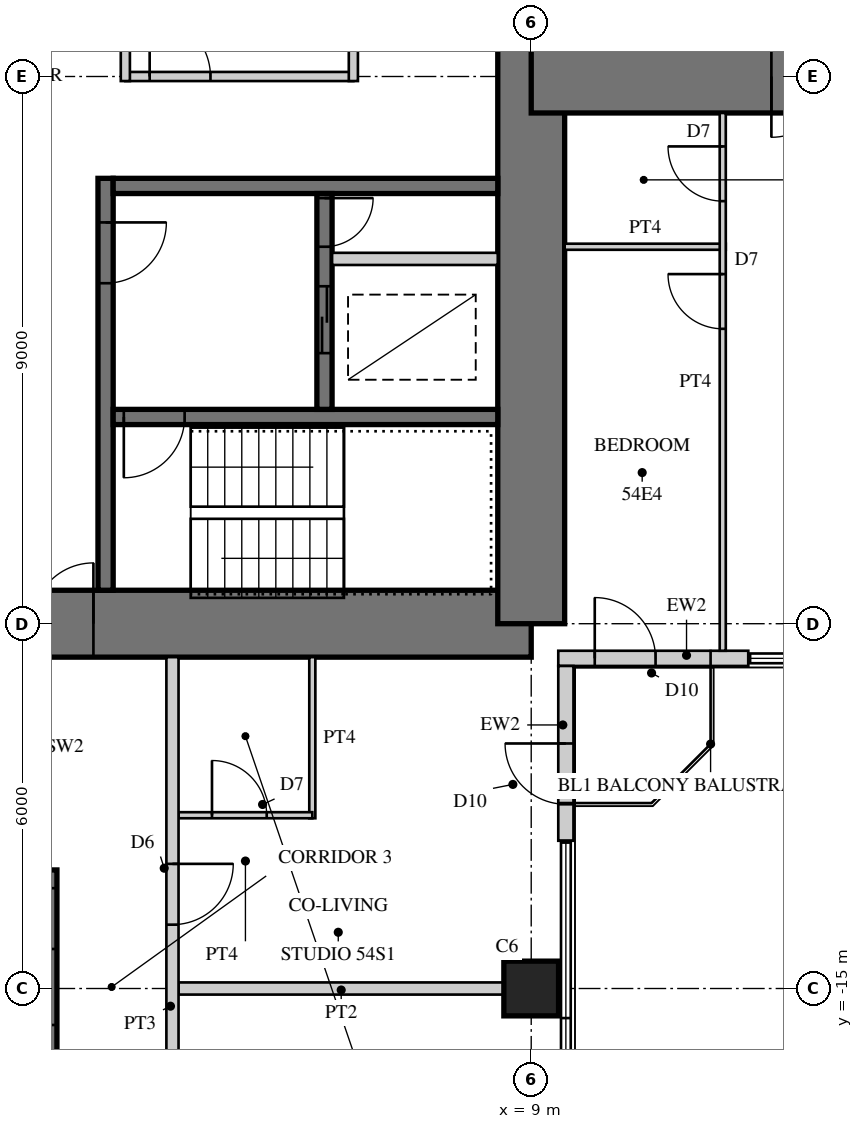
"""IFC4 building model, lengths in metres.
Left out: names, types, materials, properties, quantities, classifications, styles, units other than length and angle.
Written with IfcOpenShell. Run it as: python <this file> out.ifc"""

import sys

from ifc_helpers import new_model, si_unit, direction, frame, frame_2d, origin, origin_2d, place, context, subcontext, project, spatial, rectangle, hollow_rectangle, extrude, element, fill, save


model = new_model("IFC4")
c1 = context("Model", 3, precision=1e-05, world=origin(), true_north=direction((0.0, 1.0)))
c2 = subcontext(c1, "Body", "Model", "MODEL_VIEW")
j1 = project(units=[si_unit("LENGTHUNIT", "METRE"), si_unit("PLANEANGLEUNIT", "RADIAN")], contexts=[c1])
p1 = place(None, origin())
s1 = spatial("IfcSite", under=j1, at=p1, CompositionType="ELEMENT")
p2 = place(p1, origin())
s2 = spatial("IfcBuilding", under=s1, at=p2, CompositionType="ELEMENT")
p3 = place(p2, frame((0.0, 0.0, 213.7)))
s3 = spatial("IfcBuildingStorey", under=s2, at=p3, CompositionType="ELEMENT", Elevation=213.7)
p4 = place(p3, frame((-9.0, -9.0, 0.0), z_axis=(0.0, 0.0, 1.0), x_axis=(1.0, 0.0, 0.0)))
e1 = element("IfcWall", 1, at=p4, inside=s3, PredefinedType="SHEAR", context=c2, shape_type="SweptSolid", body=[
    extrude(rectangle(XDim=18.0, YDim=1.1, at=frame_2d((9.0, 0.0))), origin(), (0.0, 0.0, 1.0), 3.4),
])
p5 = place(p4, frame((9.8, 0.0, 0.0)))
e2 = element("IfcOpeningElement", 2, at=p5, cuts=e1, PredefinedType="OPENING", context=c2, shape_type="SweptSolid", body=[
    extrude(rectangle(XDim=1.0, YDim=2.4, at=frame_2d((0.5, 1.2))), frame((0.0, 0.56, 0.0), z_axis=(0.0, -1.0, 0.0), x_axis=(1.0, 0.0, 0.0)), (0.0, 0.0, 1.0), 1.12),
])
p6 = place(p3, frame((9.0, -9.0, 0.0), z_axis=(0.0, 0.0, 1.0), x_axis=(0.0, 1.0, 0.0)))
e3 = element("IfcWall", 3, at=p6, inside=s3, PredefinedType="SHEAR", context=c2, shape_type="SweptSolid", body=[
    extrude(rectangle(XDim=18.0, YDim=1.1, at=frame_2d((9.0, 0.0))), origin(), (0.0, 0.0, 1.0), 3.4),
])
p7 = place(p6, frame((9.8, 0.0, 0.0)))
e4 = element("IfcOpeningElement", 4, at=p7, cuts=e3, PredefinedType="OPENING", context=c2, shape_type="SweptSolid", body=[
    extrude(rectangle(XDim=1.0, YDim=2.4, at=frame_2d((0.5, 1.2))), frame((0.0, 0.56, 0.0), z_axis=(0.0, -1.0, 0.0), x_axis=(1.0, 0.0, 0.0)), (0.0, 0.0, 1.0), 1.12),
])
p8 = place(p3, frame((2.0, -1.675, 0.0), z_axis=(0.0, 0.0, 1.0), x_axis=(0.0, -1.0, 0.0)))
e5 = element("IfcWall", 5, at=p8, inside=s3, PredefinedType="SHEAR", context=c2, shape_type="SweptSolid", body=[
    extrude(rectangle(XDim=6.775, YDim=0.25, at=frame_2d((3.387, 0.0))), origin(), (0.0, 0.0, 1.0), 3.4),
])
p9 = place(p8, frame((0.725, 0.0, 0.0)))
e6 = element("IfcOpeningElement", 6, at=p9, cuts=e5, PredefinedType="OPENING", context=c2, shape_type="SweptSolid", body=[
    extrude(rectangle(XDim=1.0, YDim=2.1, at=frame_2d((0.5, 1.05))), frame((0.0, 0.135, 0.0), z_axis=(0.0, -1.0, 0.0), x_axis=(1.0, 0.0, 0.0)), (0.0, 0.0, 1.0), 0.27),
])
p10 = place(p3, frame((2.125, -1.8, 0.0), z_axis=(0.0, 0.0, 1.0), x_axis=(1.0, 0.0, 0.0)))
e7 = element("IfcWall", 7, at=p10, inside=s3, PredefinedType="SHEAR", context=c2, shape_type="SweptSolid", body=[
    extrude(rectangle(XDim=6.325, YDim=0.25, at=frame_2d((3.163, 0.0))), origin(), (0.0, 0.0, 1.0), 3.4),
])
p11 = place(p3, frame((2.125, -5.6, 0.0), z_axis=(0.0, 0.0, 1.0), x_axis=(1.0, 0.0, 0.0)))
e8 = element("IfcWall", 8, at=p11, inside=s3, PredefinedType="SHEAR", context=c2, shape_type="SweptSolid", body=[
    extrude(rectangle(XDim=6.325, YDim=0.25, at=frame_2d((3.163, 0.0))), origin(), (0.0, 0.0, 1.0), 3.4),
])
p12 = place(p11, frame((0.175, 0.0, 0.0)))
e9 = element("IfcOpeningElement", 9, at=p12, cuts=e8, PredefinedType="OPENING", context=c2, shape_type="SweptSolid", body=[
    extrude(rectangle(XDim=1.0, YDim=2.1, at=frame_2d((0.5, 1.05))), frame((0.0, 0.135, 0.0), z_axis=(0.0, -1.0, 0.0), x_axis=(1.0, 0.0, 0.0)), (0.0, 0.0, 1.0), 0.27),
])
p13 = place(p3, frame((5.6, -1.925, 0.0), z_axis=(0.0, 0.0, 1.0), x_axis=(0.0, -1.0, 0.0)))
e10 = element("IfcWall", 10, at=p13, inside=s3, PredefinedType="SHEAR", context=c2, shape_type="SweptSolid", body=[
    extrude(rectangle(XDim=3.55, YDim=0.25, at=frame_2d((1.775, 0.0))), origin(), (0.0, 0.0, 1.0), 3.4),
])
p14 = place(p13, frame((1.525, 0.0, 0.0)))
e11 = element("IfcOpeningElement", 11, at=p14, cuts=e10, PredefinedType="OPENING", context=c2, shape_type="SweptSolid", body=[
    extrude(rectangle(XDim=1.1, YDim=2.2, at=frame_2d((0.55, 1.1))), frame((0.0, 0.135, 0.0), z_axis=(0.0, -1.0, 0.0), x_axis=(1.0, 0.0, 0.0)), (0.0, 0.0, 1.0), 0.27),
])
p15 = place(p13, frame((0.075, 0.0, 0.0)))
e12 = element("IfcOpeningElement", 12, at=p15, cuts=e10, PredefinedType="OPENING", context=c2, shape_type="SweptSolid", body=[
    extrude(rectangle(XDim=0.8, YDim=2.1, at=frame_2d((0.4, 1.05))), frame((0.0, 0.135, 0.0), z_axis=(0.0, -1.0, 0.0), x_axis=(1.0, 0.0, 0.0)), (0.0, 0.0, 1.0), 0.27),
])
p16 = place(p3, frame((5.725, -3.0, 0.0), z_axis=(0.0, 0.0, 1.0), x_axis=(1.0, 0.0, 0.0)))
e13 = element("IfcWall", 13, at=p16, inside=s3, PredefinedType="PARTITIONING", context=c2, shape_type="SweptSolid", body=[
    extrude(rectangle(XDim=2.725, YDim=0.2, at=frame_2d((1.362, 0.0))), origin(), (0.0, 0.0, 1.0), 3.4),
])
p17 = place(p3, frame((9.0, 0.0, 0.0), z_axis=(0.0, 0.0, 1.0), x_axis=(1.0, 0.0, 0.0)))
e14 = element("IfcWall", 14, at=p17, inside=s3, PredefinedType="SHEAR", context=c2, shape_type="SweptSolid", body=[
    extrude(rectangle(XDim=9.0, YDim=1.2, at=frame_2d((4.5, 0.0))), origin(), (0.0, 0.0, 1.0), 3.4),
])
p18 = place(p17, frame((3.95, 0.0, 0.0)))
e15 = element("IfcOpeningElement", 15, at=p18, cuts=e14, PredefinedType="OPENING", context=c2, shape_type="SweptSolid", body=[
    extrude(rectangle(XDim=1.0, YDim=2.15, at=frame_2d((0.5, 1.075))), frame((0.0, 0.61, 0.0), z_axis=(0.0, -1.0, 0.0), x_axis=(1.0, 0.0, 0.0)), (0.0, 0.0, 1.0), 1.22),
])
p19 = place(p17, frame((7.0, 0.0, 0.0)))
e16 = element("IfcOpeningElement", 16, at=p19, cuts=e14, PredefinedType="OPENING", context=c2, shape_type="SweptSolid", body=[
    extrude(rectangle(XDim=1.0, YDim=2.2, at=frame_2d((0.5, 1.1))), frame((0.0, 0.61, 0.0), z_axis=(0.0, -1.0, 0.0), x_axis=(1.0, 0.0, 0.0)), (0.0, 0.0, 1.0), 1.22),
])
p20 = place(p3, frame((0.0, -13.05, 0.0), z_axis=(0.0, 0.0, 1.0), x_axis=(0.0, -1.0, 0.0)))
e17 = element("IfcWall", 17, at=p20, inside=s3, PredefinedType="SHEAR", context=c2, shape_type="SweptSolid", body=[
    extrude(rectangle(XDim=13.95, YDim=2.4, at=frame_2d((6.975, 0.0))), origin(), (0.0, 0.0, 1.0), 3.4),
])
p21 = place(p20, frame((0.3, 0.0, 0.0)))
e18 = element("IfcOpeningElement", 18, at=p21, cuts=e17, PredefinedType="OPENING", context=c2, shape_type="SweptSolid", body=[
    extrude(rectangle(XDim=1.0, YDim=2.15, at=frame_2d((0.5, 1.075))), frame((0.0, 1.21, 0.0), z_axis=(0.0, -1.0, 0.0), x_axis=(1.0, 0.0, 0.0)), (0.0, 0.0, 1.0), 2.42),
])
p22 = place(p20, frame((2.55, 0.0, 0.0)))
e19 = element("IfcOpeningElement", 19, at=p22, cuts=e17, PredefinedType="OPENING", context=c2, shape_type="SweptSolid", body=[
    extrude(rectangle(XDim=1.0, YDim=2.15, at=frame_2d((0.5, 1.075))), frame((0.0, 1.21, 0.0), z_axis=(0.0, -1.0, 0.0), x_axis=(1.0, 0.0, 0.0)), (0.0, 0.0, 1.0), 2.42),
])
p23 = place(p20, frame((9.2, 0.0, 0.0)))
e20 = element("IfcOpeningElement", 20, at=p23, cuts=e17, PredefinedType="OPENING", context=c2, shape_type="SweptSolid", body=[
    extrude(rectangle(XDim=1.0, YDim=2.0, at=frame_2d((0.5, 1.0))), frame((0.0, 1.21, 0.0), z_axis=(0.0, -1.0, 0.0), x_axis=(1.0, 0.0, 0.0)), (0.0, 0.0, 1.0), 2.42),
])
p24 = place(p3, frame((9.0, -15.0, 0.0), z_axis=(0.0, 0.0, 1.0), x_axis=(1.0, 0.0, 0.0)))
e21 = element("IfcColumn", 21, at=p24, inside=s3, PredefinedType="COLUMN", context=c2, shape_type="SweptSolid", body=[
    extrude(rectangle(XDim=0.9, YDim=0.9, at=origin_2d()), origin(), (0.0, 0.0, 1.0), 3.4),
])
p25 = place(p3, frame((9.445, -9.57, 0.0), z_axis=(0.0, 0.0, 1.0), x_axis=(1.0, 0.0, 0.0)))
e22 = element("IfcWall", 22, at=p25, inside=s3, PredefinedType="SOLIDWALL", context=c2, shape_type="SweptSolid", body=[
    extrude(rectangle(XDim=3.125, YDim=0.25, at=frame_2d((1.562, 0.0))), origin(), (0.0, 0.0, 1.0), 3.15),
])
p26 = place(p25, frame((0.6, 0.0, 0.0)))
e23 = element("IfcOpeningElement", 23, at=p26, cuts=e22, PredefinedType="OPENING", context=c2, shape_type="SweptSolid", body=[
    extrude(rectangle(XDim=1.0, YDim=2.2, at=frame_2d((0.5, 1.1))), frame((0.0, 0.135, 0.0), z_axis=(0.0, -1.0, 0.0), x_axis=(1.0, 0.0, 0.0)), (0.0, 0.0, 1.0), 0.27),
])
p27 = place(p3, frame((9.57, -12.57, 0.0), z_axis=(0.0, 0.0, 1.0), x_axis=(0.0, 1.0, 0.0)))
e24 = element("IfcWall", 24, at=p27, inside=s3, PredefinedType="SOLIDWALL", context=c2, shape_type="SweptSolid", body=[
    extrude(rectangle(XDim=2.875, YDim=0.25, at=frame_2d((1.438, 0.0))), origin(), (0.0, 0.0, 1.0), 3.15),
])
p28 = place(p27, frame((0.6, 0.0, 0.0)))
e25 = element("IfcOpeningElement", 25, at=p28, cuts=e24, PredefinedType="OPENING", context=c2, shape_type="SweptSolid", body=[
    extrude(rectangle(XDim=1.0, YDim=2.2, at=frame_2d((0.5, 1.1))), frame((0.0, 0.135, 0.0), z_axis=(0.0, -1.0, 0.0), x_axis=(1.0, 0.0, 0.0)), (0.0, 0.0, 1.0), 0.27),
])
p29 = place(p3, frame((2.325, 0.0, 0.0), z_axis=(0.0, 0.0, 1.0), x_axis=(1.0, 0.0, 0.0)))
e26 = element("IfcWall", 26, at=p29, inside=s3, PredefinedType="PARTITIONING", context=c2, shape_type="SweptSolid", body=[
    extrude(rectangle(XDim=3.75, YDim=0.15, at=frame_2d((1.875, 0.0))), origin(), (0.0, 0.0, 1.0), 3.15),
])
p30 = place(p29, frame((0.4, 0.0, 0.0)))
e27 = element("IfcOpeningElement", 27, at=p30, cuts=e26, PredefinedType="OPENING", context=c2, shape_type="SweptSolid", body=[
    extrude(rectangle(XDim=1.0, YDim=2.1, at=frame_2d((0.5, 1.05))), frame((0.0, 0.085, 0.0), z_axis=(0.0, -1.0, 0.0), x_axis=(1.0, 0.0, 0.0)), (0.0, 0.0, 1.0), 0.17),
])
for number, where, z_axis, x_axis in (
    (28, (2.325, 1.875, 0.0), (0.0, 0.0, 1.0), (0.0, -1.0, 0.0)),
    (29, (6.075, -0.075, 0.0), (0.0, 0.0, 1.0), (0.0, 1.0, 0.0)),
):
    element("IfcWall", number, at=place(p3, frame(where, z_axis=z_axis, x_axis=x_axis)), inside=s3, PredefinedType="PARTITIONING", context=c2, shape_type="SweptSolid", body=[
        extrude(rectangle(XDim=1.95, YDim=0.15, at=frame_2d((0.975, 0.0))), origin(), (0.0, 0.0, 1.0), 3.15),
    ])
p31 = place(p3, frame((9.55, -2.8, 0.0), z_axis=(0.0, 0.0, 1.0), x_axis=(1.0, 0.0, 0.0)))
e30 = element("IfcWall", 30, at=p31, inside=s3, PredefinedType="PARTITIONING", context=c2, shape_type="SweptSolid", body=[
    extrude(rectangle(XDim=2.65, YDim=0.1, at=frame_2d((1.325, 0.0))), origin(), (0.0, 0.0, 1.0), 3.15),
])
p32 = place(p3, frame((12.15, -9.445, 0.0), z_axis=(0.0, 0.0, 1.0), x_axis=(0.0, 1.0, 0.0)))
e31 = element("IfcWall", 31, at=p32, inside=s3, PredefinedType="PARTITIONING", context=c2, shape_type="SweptSolid", body=[
    extrude(rectangle(XDim=8.845, YDim=0.1, at=frame_2d((4.422, 0.0))), origin(), (0.0, 0.0, 1.0), 3.15),
])
p33 = place(p32, frame((5.295, 0.0, 0.0)))
e32 = element("IfcOpeningElement", 32, at=p33, cuts=e31, PredefinedType="OPENING", context=c2, shape_type="SweptSolid", body=[
    extrude(rectangle(XDim=0.9, YDim=2.1, at=frame_2d((0.45, 1.05))), frame((0.0, 0.06, 0.0), z_axis=(0.0, -1.0, 0.0), x_axis=(1.0, 0.0, 0.0)), (0.0, 0.0, 1.0), 0.12),
])
p34 = place(p32, frame((7.395, 0.0, 0.0)))
e33 = element("IfcOpeningElement", 33, at=p34, cuts=e31, PredefinedType="OPENING", context=c2, shape_type="SweptSolid", body=[
    extrude(rectangle(XDim=0.9, YDim=2.1, at=frame_2d((0.45, 1.05))), frame((0.0, 0.06, 0.0), z_axis=(0.0, -1.0, 0.0), x_axis=(1.0, 0.0, 0.0)), (0.0, 0.0, 1.0), 0.12),
])
p35 = place(p3, frame((5.4, -9.55, 0.0), z_axis=(0.0, 0.0, 1.0), x_axis=(0.0, -1.0, 0.0)))
e34 = element("IfcWall", 34, at=p35, inside=s3, PredefinedType="PARTITIONING", context=c2, shape_type="SweptSolid", body=[
    extrude(rectangle(XDim=2.65, YDim=0.1, at=frame_2d((1.325, 0.0))), origin(), (0.0, 0.0, 1.0), 3.15),
])
p36 = place(p3, frame((3.2, -12.15, 0.0), z_axis=(0.0, 0.0, 1.0), x_axis=(1.0, 0.0, 0.0)))
e35 = element("IfcWall", 35, at=p36, inside=s3, PredefinedType="PARTITIONING", context=c2, shape_type="SweptSolid", body=[
    extrude(rectangle(XDim=2.2, YDim=0.1, at=frame_2d((1.1, 0.0))), origin(), (0.0, 0.0, 1.0), 3.15),
])
p37 = place(p36, frame((0.55, 0.0, 0.0)))
e36 = element("IfcOpeningElement", 36, at=p37, cuts=e35, PredefinedType="OPENING", context=c2, shape_type="SweptSolid", body=[
    extrude(rectangle(XDim=0.9, YDim=2.1, at=frame_2d((0.45, 1.05))), frame((0.0, 0.06, 0.0), z_axis=(0.0, -1.0, 0.0), x_axis=(1.0, 0.0, 0.0)), (0.0, 0.0, 1.0), 0.12),
])
p38 = place(p3, frame((3.2, -15.0, 0.0), z_axis=(0.0, 0.0, 1.0), x_axis=(1.0, 0.0, 0.0)))
e37 = element("IfcWall", 37, at=p38, inside=s3, PredefinedType="SOLIDWALL", context=c2, shape_type="SweptSolid", body=[
    extrude(rectangle(XDim=5.35, YDim=0.2, at=frame_2d((2.675, 0.0))), origin(), (0.0, 0.0, 1.0), 2.1),
])
p39 = place(p3, frame((3.1, -9.55, 0.0), z_axis=(0.0, 0.0, 1.0), x_axis=(0.0, -1.0, 0.0)))
e38 = element("IfcWall", 38, at=p39, inside=s3, PredefinedType="SOLIDWALL", context=c2, shape_type="SweptSolid", body=[
    extrude(rectangle(XDim=11.45, YDim=0.2, at=frame_2d((5.725, 0.0))), origin(), (0.0, 0.0, 1.0), 3.15),
])
p40 = place(p39, frame((3.4, 0.0, 0.0)))
e39 = element("IfcOpeningElement", 39, at=p40, cuts=e38, PredefinedType="OPENING", context=c2, shape_type="SweptSolid", body=[
    extrude(rectangle(XDim=1.0, YDim=2.15, at=frame_2d((0.5, 1.075))), frame((0.0, 0.11, 0.0), z_axis=(0.0, -1.0, 0.0), x_axis=(1.0, 0.0, 0.0)), (0.0, 0.0, 1.0), 0.22),
])
p41 = place(p39, frame((6.65, 0.0, 0.0)))
e40 = element("IfcOpeningElement", 40, at=p41, cuts=e38, PredefinedType="OPENING", context=c2, shape_type="SweptSolid", body=[
    extrude(rectangle(XDim=1.0, YDim=2.2, at=frame_2d((0.5, 1.1))), frame((0.0, 0.11, 0.0), z_axis=(0.0, -1.0, 0.0), x_axis=(1.0, 0.0, 0.0)), (0.0, 0.0, 1.0), 0.22),
])
p42 = place(p26, origin())
e41 = element("IfcDoor", 41, at=p42, inside=s3, OperationType="SINGLE_SWING_LEFT", PredefinedType="DOOR", context=c2, shape_type="SweptSolid", body=[
    extrude(hollow_rectangle(XDim=1.0, YDim=2.2, WallThickness=0.06, at=frame_2d((0.5, 1.1))), frame((0.0, 0.025, 0.0), z_axis=(0.0, -1.0, 0.0), x_axis=(1.0, 0.0, 0.0)), (0.0, 0.0, 1.0), 0.05),
    extrude(rectangle(XDim=0.879, YDim=2.079, at=frame_2d((0.5, 1.1))), frame((0.0, 0.025, 0.0), z_axis=(0.0, -1.0, 0.0), x_axis=(1.0, 0.0, 0.0)), (0.0, 0.0, 1.0), 0.05),
])
fill(e23, e41)
p43 = place(p28, origin())
e42 = element("IfcDoor", 42, at=p43, inside=s3, OperationType="SINGLE_SWING_RIGHT", PredefinedType="DOOR", context=c2, shape_type="SweptSolid", body=[
    extrude(hollow_rectangle(XDim=1.0, YDim=2.2, WallThickness=0.06, at=frame_2d((0.5, 1.1))), frame((0.0, 0.025, 0.0), z_axis=(0.0, -1.0, 0.0), x_axis=(1.0, 0.0, 0.0)), (0.0, 0.0, 1.0), 0.05),
    extrude(rectangle(XDim=0.879, YDim=2.079, at=frame_2d((0.5, 1.1))), frame((0.0, 0.025, 0.0), z_axis=(0.0, -1.0, 0.0), x_axis=(1.0, 0.0, 0.0)), (0.0, 0.0, 1.0), 0.05),
])
fill(e25, e42)
p44 = place(p30, origin())
e43 = element("IfcDoor", 43, at=p44, inside=s3, OperationType="SINGLE_SWING_LEFT", PredefinedType="DOOR", context=c2, shape_type="SweptSolid", body=[
    extrude(rectangle(XDim=1.0, YDim=2.1, at=frame_2d((0.5, 1.05))), frame((0.0, 0.025, 0.0), z_axis=(0.0, -1.0, 0.0), x_axis=(1.0, 0.0, 0.0)), (0.0, 0.0, 1.0), 0.05),
])
fill(e27, e43)
p45 = place(p33, origin())
e44 = element("IfcDoor", 44, at=p45, inside=s3, OperationType="SINGLE_SWING_RIGHT", PredefinedType="DOOR", context=c2, shape_type="SweptSolid", body=[
    extrude(rectangle(XDim=0.9, YDim=2.1, at=frame_2d((0.45, 1.05))), frame((0.0, 0.025, 0.0), z_axis=(0.0, -1.0, 0.0), x_axis=(1.0, 0.0, 0.0)), (0.0, 0.0, 1.0), 0.05),
])
fill(e32, e44)
p46 = place(p34, origin())
e45 = element("IfcDoor", 45, at=p46, inside=s3, OperationType="SINGLE_SWING_RIGHT", PredefinedType="DOOR", context=c2, shape_type="SweptSolid", body=[
    extrude(rectangle(XDim=0.9, YDim=2.1, at=frame_2d((0.45, 1.05))), frame((0.0, 0.025, 0.0), z_axis=(0.0, -1.0, 0.0), x_axis=(1.0, 0.0, 0.0)), (0.0, 0.0, 1.0), 0.05),
])
fill(e33, e45)
p47 = place(p37, origin())
e46 = element("IfcDoor", 46, at=p47, inside=s3, OperationType="SINGLE_SWING_LEFT", PredefinedType="DOOR", context=c2, shape_type="SweptSolid", body=[
    extrude(rectangle(XDim=0.9, YDim=2.1, at=frame_2d((0.45, 1.05))), frame((0.0, 0.025, 0.0), z_axis=(0.0, -1.0, 0.0), x_axis=(1.0, 0.0, 0.0)), (0.0, 0.0, 1.0), 0.05),
])
fill(e36, e46)
p48 = place(p40, origin())
e47 = element("IfcDoor", 47, at=p48, inside=s3, OperationType="SINGLE_SWING_LEFT", PredefinedType="DOOR", context=c2, shape_type="SweptSolid", body=[
    extrude(rectangle(XDim=1.0, YDim=2.15, at=frame_2d((0.5, 1.075))), frame((0.0, 0.025, 0.0), z_axis=(0.0, -1.0, 0.0), x_axis=(1.0, 0.0, 0.0)), (0.0, 0.0, 1.0), 0.05),
])
fill(e39, e47)
p49 = place(p18, frame((1.0, 0.0, 0.0), z_axis=(0.0, 0.0, 1.0), x_axis=(-1.0, 0.0, 0.0)))
e48 = element("IfcDoor", 48, at=p49, inside=s3, OperationType="SINGLE_SWING_RIGHT", PredefinedType="DOOR", context=c2, shape_type="SweptSolid", body=[
    extrude(rectangle(XDim=1.0, YDim=2.15, at=frame_2d((0.5, 1.075))), frame((0.0, 0.025, 0.0), z_axis=(0.0, -1.0, 0.0), x_axis=(1.0, 0.0, 0.0)), (0.0, 0.0, 1.0), 0.05),
])
fill(e15, e48)
p50 = place(p5, origin())
e49 = element("IfcDoor", 49, at=p50, inside=s3, OperationType="SINGLE_SWING_RIGHT", PredefinedType="DOOR", context=c2, shape_type="SweptSolid", body=[
    extrude(rectangle(XDim=1.0, YDim=2.4, at=frame_2d((0.5, 1.2))), frame((0.0, 0.055, 0.0), z_axis=(0.0, -1.0, 0.0), x_axis=(1.0, 0.0, 0.0)), (0.0, 0.0, 1.0), 0.05),
])
fill(e2, e49)
p51 = place(p9, origin())
e50 = element("IfcDoor", 50, at=p51, inside=s3, OperationType="SINGLE_SWING_LEFT", PredefinedType="DOOR", context=c2, shape_type="SweptSolid", body=[
    extrude(rectangle(XDim=1.0, YDim=2.1, at=frame_2d((0.5, 1.05))), frame((0.0, 0.025, 0.0), z_axis=(0.0, -1.0, 0.0), x_axis=(1.0, 0.0, 0.0)), (0.0, 0.0, 1.0), 0.05),
])
fill(e6, e50)
p52 = place(p12, frame((1.0, 0.0, 0.0), z_axis=(0.0, 0.0, 1.0), x_axis=(-1.0, 0.0, 0.0)))
e51 = element("IfcDoor", 51, at=p52, inside=s3, OperationType="SINGLE_SWING_RIGHT", PredefinedType="DOOR", context=c2, shape_type="SweptSolid", body=[
    extrude(rectangle(XDim=1.0, YDim=2.1, at=frame_2d((0.5, 1.05))), frame((0.0, 0.025, 0.0), z_axis=(0.0, -1.0, 0.0), x_axis=(1.0, 0.0, 0.0)), (0.0, 0.0, 1.0), 0.05),
])
fill(e9, e51)
p53 = place(p14, origin())
e52 = element("IfcDoor", 52, at=p53, inside=s3, OperationType="DOUBLE_DOOR_SLIDING", PredefinedType="DOOR", context=c2, shape_type="SweptSolid", body=[
    extrude(rectangle(XDim=1.1, YDim=2.2, at=frame_2d((0.55, 1.1))), frame((0.0, 0.025, 0.0), z_axis=(0.0, -1.0, 0.0), x_axis=(1.0, 0.0, 0.0)), (0.0, 0.0, 1.0), 0.05),
])
fill(e11, e52)
p54 = place(p15, origin())
e53 = element("IfcDoor", 53, at=p54, inside=s3, OperationType="SINGLE_SWING_LEFT", PredefinedType="DOOR", context=c2, shape_type="SweptSolid", body=[
    extrude(rectangle(XDim=0.8, YDim=2.1, at=frame_2d((0.4, 1.05))), frame((0.0, 0.025, 0.0), z_axis=(0.0, -1.0, 0.0), x_axis=(1.0, 0.0, 0.0)), (0.0, 0.0, 1.0), 0.05),
])
fill(e12, e53)
save(model, sys.argv[1])
